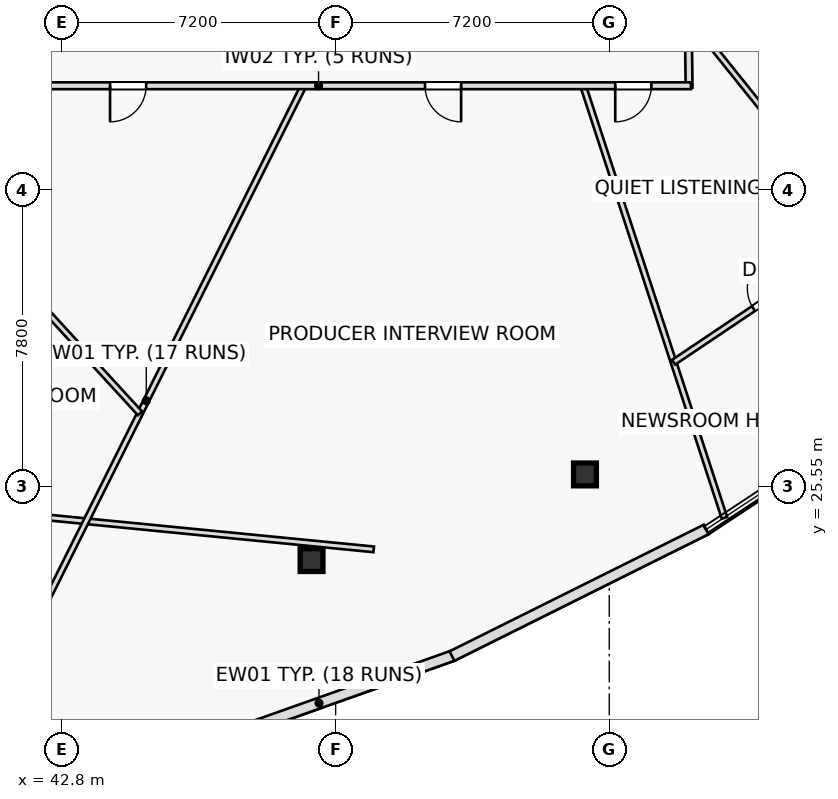
"""IFC4 building model, lengths in metres.
Left out: names, types, materials, properties, quantities, classifications, styles, units other than length and angle.
Written with IfcOpenShell. Run it as: python <this file> out.ifc"""

import sys

from ifc_helpers import new_model, si_unit, direction, frame, frame_2d, origin, origin_2d, place, context, subcontext, project, spatial, rectangle, hollow_rectangle, extrude, element, fill, save


model = new_model("IFC4")
c1 = context("Model", 3, precision=1e-05, world=origin(), true_north=direction((0.0, 1.0)))
c2 = subcontext(c1, "Body", "Model", "MODEL_VIEW")
j1 = project(units=[si_unit("LENGTHUNIT", "METRE"), si_unit("PLANEANGLEUNIT", "RADIAN")], contexts=[c1])
p1 = place(None, origin())
s1 = spatial("IfcSite", under=j1, at=p1, CompositionType="ELEMENT")
p2 = place(p1, origin())
s2 = spatial("IfcBuilding", under=s1, at=p2, CompositionType="ELEMENT")
p3 = place(p2, frame((0.0, 0.0, 188.75)))
s3 = spatial("IfcBuildingStorey", under=s2, at=p3, CompositionType="ELEMENT", Elevation=188.75)
for number, where, z_axis, x_axis in (
    (1, (49.366, 23.619, 0.0), (0.0, 0.0, 1.0), (1.0, 0.0, 0.0)),
    (2, (56.561, 25.873, 0.0), (0.0, 0.0, 1.0), (1.0, 0.0, 0.0)),
):
    element("IfcColumn", number, at=place(p3, frame(where, z_axis=z_axis, x_axis=x_axis)), inside=s3, PredefinedType="COLUMN", context=c2, shape_type="SweptSolid", body=[
        extrude(hollow_rectangle(XDim=0.6, YDim=0.6, WallThickness=0.036, at=origin_2d()), origin(), (0.0, 0.0, 1.0), 3.55),
    ])
p4 = place(p3, frame((39.589, 25.018, 0.0), z_axis=(0.0, 0.0, 1.0), x_axis=(0.99524905582, -0.097361783517, 0.0)))
e3 = element("IfcWall", 3, at=p4, inside=s3, PredefinedType="PARTITIONING", context=c2, shape_type="SweptSolid", body=[
    extrude(rectangle(XDim=11.467, YDim=0.15, at=frame_2d((5.733, 0.0))), origin(), (0.0, 0.0, 1.0), 2.935),
])
p5 = place(p3, frame((49.156, 36.1, 0.0), z_axis=(0.0, 0.0, 1.0), x_axis=(-0.446733908908, -0.894666873552, 0.0)))
e4 = element("IfcWall", 4, at=p5, inside=s3, PredefinedType="PARTITIONING", context=c2, shape_type="SweptSolid", body=[
    extrude(rectangle(XDim=18.529, YDim=0.15, at=frame_2d((9.264, 0.0))), origin(), (0.0, 0.0, 1.0), 2.935),
])
p6 = place(p3, frame((56.512, 36.1, 0.0), z_axis=(0.0, 0.0, 1.0), x_axis=(0.310932807992, -0.950431895989, 0.0)))
e5 = element("IfcWall", 5, at=p6, inside=s3, PredefinedType="PARTITIONING", context=c2, shape_type="SweptSolid", body=[
    extrude(rectangle(XDim=11.962, YDim=0.15, at=frame_2d((5.981, 0.0))), origin(), (0.0, 0.0, 1.0), 2.935),
])
p7 = place(p3, frame((59.278, 37.923, 0.0), z_axis=(0.0, 0.0, 1.0), x_axis=(0.625817580047, -0.7799694587, 0.0)))
e6 = element("IfcWall", 6, at=p7, inside=s3, PredefinedType="PARTITIONING", context=c2, shape_type="SweptSolid", body=[
    extrude(rectangle(XDim=11.504, YDim=0.15, at=frame_2d((5.752, 0.0))), origin(), (0.0, 0.0, 1.0), 2.935),
])
p8 = place(p3, frame((37.144, 35.881, 0.0), z_axis=(0.0, 0.0, 1.0), x_axis=(0.676055232475, -0.736850950086, 0.0)))
e7 = element("IfcWall", 7, at=p8, inside=s3, PredefinedType="PARTITIONING", context=c2, shape_type="SweptSolid", body=[
    extrude(rectangle(XDim=11.401, YDim=0.15, at=frame_2d((5.7, 0.0))), origin(), (0.0, 0.0, 1.0), 2.935),
])
p9 = place(p8, frame((5.225, 0.0, 0.0)))
e8 = element("IfcOpeningElement", 8, at=p9, cuts=e7, PredefinedType="OPENING", context=c2, shape_type="SweptSolid", body=[
    extrude(rectangle(XDim=0.95, YDim=2.05, at=frame_2d((0.475, 1.025))), frame((0.0, 0.085, 0.0), z_axis=(0.0, -1.0, 0.0), x_axis=(1.0, 0.0, 0.0)), (0.0, 0.0, 1.0), 0.17),
])
p10 = place(p3, frame((58.892, 28.824, 0.0), z_axis=(0.0, 0.0, 1.0), x_axis=(0.829965651244, 0.557814501205, 0.0)))
e9 = element("IfcWall", 9, at=p10, inside=s3, PredefinedType="PARTITIONING", context=c2, shape_type="SweptSolid", body=[
    extrude(rectangle(XDim=6.017, YDim=0.15, at=frame_2d((3.008, 0.0))), origin(), (0.0, 0.0, 1.0), 2.935),
])
p11 = place(p10, frame((2.533, 0.0, 0.0)))
e10 = element("IfcOpeningElement", 10, at=p11, cuts=e9, PredefinedType="OPENING", context=c2, shape_type="SweptSolid", body=[
    extrude(rectangle(XDim=0.95, YDim=2.05, at=frame_2d((0.475, 1.025))), frame((0.0, 0.085, 0.0), z_axis=(0.0, -1.0, 0.0), x_axis=(1.0, 0.0, 0.0)), (0.0, 0.0, 1.0), 0.17),
])
p12 = place(p3, frame((59.24, 41.1, 0.0), z_axis=(0.0, 0.0, 1.0), x_axis=(0.011891834917, -0.999929289631, 0.0)))
e11 = element("IfcWall", 11, at=p12, inside=s3, PredefinedType="PARTITIONING", context=c2, shape_type="SweptSolid", body=[
    extrude(rectangle(XDim=5.05, YDim=0.18, at=frame_2d((2.525, 0.0))), origin(), (0.0, 0.0, 1.0), 2.935),
])
p13 = place(p12, frame((1.305, 0.0, 0.0)))
e12 = element("IfcOpeningElement", 12, at=p13, cuts=e11, PredefinedType="OPENING", context=c2, shape_type="SweptSolid", body=[
    extrude(rectangle(XDim=0.95, YDim=2.05, at=frame_2d((0.475, 1.025))), frame((0.0, 0.1, 0.0), z_axis=(0.0, -1.0, 0.0), x_axis=(1.0, 0.0, 0.0)), (0.0, 0.0, 1.0), 0.2),
])
p14 = place(p3, frame((59.35, 36.1, 0.0), z_axis=(0.0, 0.0, 1.0), x_axis=(-1.0, 0.0, 0.0)))
e13 = element("IfcWall", 13, at=p14, inside=s3, PredefinedType="PARTITIONING", context=c2, shape_type="SweptSolid", body=[
    extrude(rectangle(XDim=19.6, YDim=0.18, at=frame_2d((9.8, 0.0))), origin(), (0.0, 0.0, 1.0), 2.935),
])
p15 = place(p14, frame((1.042, 0.0, 0.0)))
e14 = element("IfcOpeningElement", 14, at=p15, cuts=e13, PredefinedType="OPENING", context=c2, shape_type="SweptSolid", body=[
    extrude(rectangle(XDim=0.95, YDim=2.05, at=frame_2d((0.475, 1.025))), frame((0.0, 0.1, 0.0), z_axis=(0.0, -1.0, 0.0), x_axis=(1.0, 0.0, 0.0)), (0.0, 0.0, 1.0), 0.2),
])
p16 = place(p14, frame((6.048, 0.0, 0.0)))
e15 = element("IfcOpeningElement", 15, at=p16, cuts=e13, PredefinedType="OPENING", context=c2, shape_type="SweptSolid", body=[
    extrude(rectangle(XDim=0.95, YDim=2.05, at=frame_2d((0.475, 1.025))), frame((0.0, 0.1, 0.0), z_axis=(0.0, -1.0, 0.0), x_axis=(1.0, 0.0, 0.0)), (0.0, 0.0, 1.0), 0.2),
])
p17 = place(p14, frame((14.336, 0.0, 0.0)))
e16 = element("IfcOpeningElement", 16, at=p17, cuts=e13, PredefinedType="OPENING", context=c2, shape_type="SweptSolid", body=[
    extrude(rectangle(XDim=0.95, YDim=2.05, at=frame_2d((0.475, 1.025))), frame((0.0, 0.1, 0.0), z_axis=(0.0, -1.0, 0.0), x_axis=(1.0, 0.0, 0.0)), (0.0, 0.0, 1.0), 0.2),
])
p18 = place(p3, frame((46.034, 18.604, 0.0), z_axis=(0.0, 0.0, 1.0), x_axis=(0.942506976487, 0.334186473804, 0.0)))
e17 = element("IfcWall", 17, at=p18, inside=s3, PredefinedType="STANDARD", context=c2, shape_type="SweptSolid", body=[
    extrude(rectangle(XDim=7.485, YDim=0.28, at=frame_2d((3.742, 0.0))), origin(), (0.0, 0.0, 1.0), 3.55),
])
p19 = place(p3, frame((53.061, 21.093, 0.0), z_axis=(0.0, 0.0, 1.0), x_axis=(0.895131780242, 0.445801633017, 0.0)))
e18 = element("IfcWall", 18, at=p19, inside=s3, PredefinedType="STANDARD", context=c2, shape_type="SweptSolid", body=[
    extrude(rectangle(XDim=7.473, YDim=0.28, at=frame_2d((3.736, 0.0))), origin(), (0.0, 0.0, 1.0), 3.55),
])
p20 = place(p11, origin())
e19 = element("IfcDoor", 19, at=p20, inside=s3, OperationType="SINGLE_SWING_RIGHT", PredefinedType="DOOR", context=c2, shape_type="SweptSolid", body=[
    extrude(rectangle(XDim=0.95, YDim=2.05, at=frame_2d((0.475, 1.025))), frame((0.0, 0.025, 0.0), z_axis=(0.0, -1.0, 0.0), x_axis=(1.0, 0.0, 0.0)), (0.0, 0.0, 1.0), 0.05),
])
fill(e10, e19)
p21 = place(p15, origin())
e20 = element("IfcDoor", 20, at=p21, inside=s3, OperationType="SINGLE_SWING_RIGHT", PredefinedType="DOOR", context=c2, shape_type="SweptSolid", body=[
    extrude(rectangle(XDim=0.95, YDim=2.05, at=frame_2d((0.475, 1.025))), frame((0.0, 0.025, 0.0), z_axis=(0.0, -1.0, 0.0), x_axis=(1.0, 0.0, 0.0)), (0.0, 0.0, 1.0), 0.05),
])
fill(e14, e20)
p22 = place(p16, origin())
e21 = element("IfcDoor", 21, at=p22, inside=s3, OperationType="SINGLE_SWING_LEFT", PredefinedType="DOOR", context=c2, shape_type="SweptSolid", body=[
    extrude(rectangle(XDim=0.95, YDim=2.05, at=frame_2d((0.475, 1.025))), frame((0.0, 0.025, 0.0), z_axis=(0.0, -1.0, 0.0), x_axis=(1.0, 0.0, 0.0)), (0.0, 0.0, 1.0), 0.05),
])
fill(e15, e21)
p23 = place(p17, origin())
e22 = element("IfcDoor", 22, at=p23, inside=s3, OperationType="SINGLE_SWING_RIGHT", PredefinedType="DOOR", context=c2, shape_type="SweptSolid", body=[
    extrude(rectangle(XDim=0.95, YDim=2.05, at=frame_2d((0.475, 1.025))), frame((0.0, 0.025, 0.0), z_axis=(0.0, -1.0, 0.0), x_axis=(1.0, 0.0, 0.0)), (0.0, 0.0, 1.0), 0.05),
])
fill(e16, e22)
save(model, sys.argv[1])
